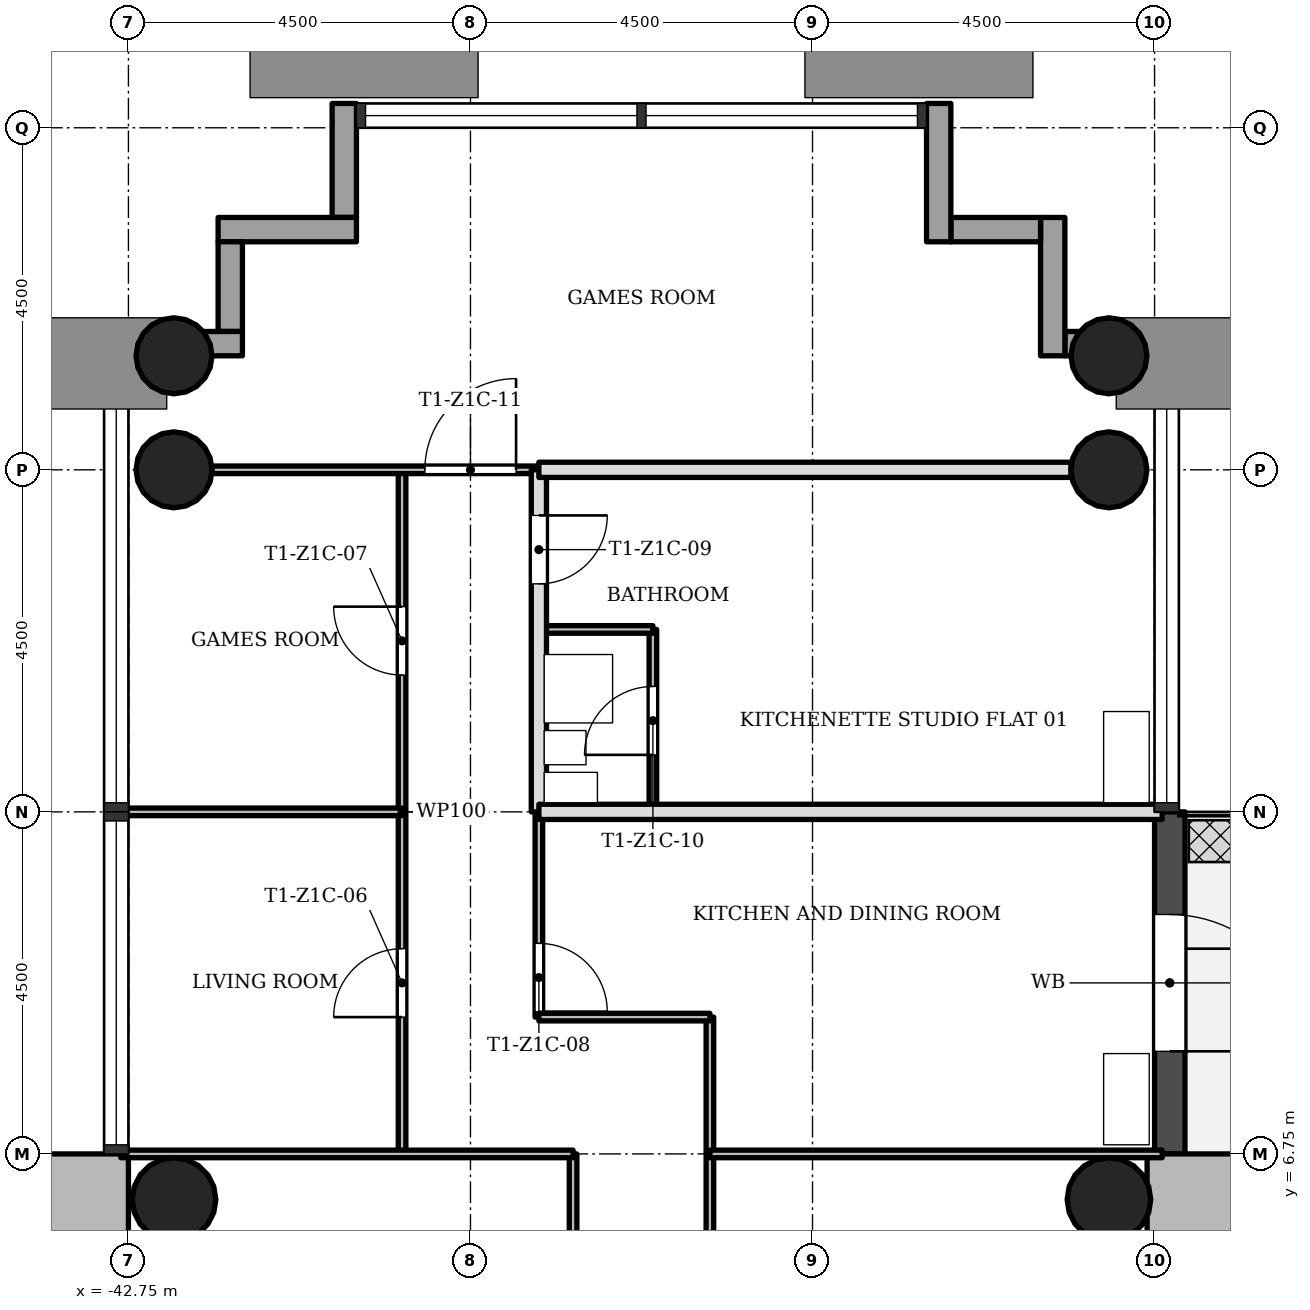
"""IFC4 building model, lengths in metres.
Left out: names, types, materials, properties, quantities, classifications, styles, units other than length and angle.
Written with IfcOpenShell. Run it as: python <this file> out.ifc"""

import sys

from ifc_helpers import new_model, si_unit, direction, frame, frame_2d, origin, origin_2d, place, context, subcontext, project, spatial, rectangle, hollow_circle, extrude, element, fill, save


model = new_model("IFC4")
c1 = context("Model", 3, precision=1e-05, world=origin(), true_north=direction((0.0, 1.0)))
c2 = subcontext(c1, "Body", "Model", "MODEL_VIEW")
j1 = project(units=[si_unit("LENGTHUNIT", "METRE"), si_unit("PLANEANGLEUNIT", "RADIAN")], contexts=[c1])
p1 = place(None, origin())
s1 = spatial("IfcSite", under=j1, at=p1, CompositionType="ELEMENT")
p2 = place(p1, origin())
s2 = spatial("IfcBuilding", under=s1, at=p2, CompositionType="ELEMENT")
p3 = place(p2, frame((0.0, 0.0, 51.7)))
s3 = spatial("IfcBuildingStorey", under=s2, at=p3, CompositionType="ELEMENT", Elevation=51.7)
p4 = place(p3, frame((-21.35, 6.2, 0.0), z_axis=(0.0, 0.0, 1.0), x_axis=(-1.0, 0.0, 0.0)))
e1 = element("IfcWall", 1, at=p4, inside=s3, PredefinedType="SHEAR", context=c2, shape_type="SweptSolid", body=[
    extrude(rectangle(XDim=7.998, YDim=1.1, at=frame_2d((3.999, 0.0))), origin(), (0.0, 0.0, 1.0), 3.4),
])
p5 = place(p3, frame((-43.3, -5.65, 0.0), z_axis=(0.0, 0.0, 1.0), x_axis=(0.0, 1.0, 0.0)))
e2 = element("IfcWall", 2, at=p5, inside=s3, PredefinedType="SHEAR", context=c2, shape_type="SweptSolid", body=[
    extrude(rectangle(XDim=12.4, YDim=1.1, at=frame_2d((6.2, 0.0))), origin(), (0.0, 0.0, 1.0), 3.4),
])
p6 = place(p5, frame((4.75, 0.0, 0.0)))
e3 = element("IfcOpeningElement", 3, at=p6, cuts=e2, PredefinedType="OPENING", context=c2, shape_type="SweptSolid", body=[
    extrude(rectangle(XDim=1.8, YDim=2.1, at=frame_2d((0.9, 1.05))), frame((0.0, 0.56, 0.0), z_axis=(0.0, -1.0, 0.0), x_axis=(1.0, 0.0, 0.0)), (0.0, 0.0, 1.0), 1.12),
])
for number, where, z_axis, x_axis in (
    (4, (-29.85, 15.75, 0.0), (0.0, 0.0, 1.0), (1.0, 0.0, 0.0)),
    (5, (-42.15, 15.75, 0.0), (0.0, 0.0, 1.0), (1.0, 0.0, 0.0)),
    (6, (-29.85, 17.25, 0.0), (0.0, 0.0, 1.0), (1.0, 0.0, 0.0)),
    (7, (-42.15, 17.25, 0.0), (0.0, 0.0, 1.0), (1.0, 0.0, 0.0)),
):
    element("IfcColumn", number, at=place(p3, frame(where, z_axis=z_axis, x_axis=x_axis)), inside=s3, PredefinedType="COLUMN", context=c2, shape_type="SweptSolid", body=[
        extrude(hollow_circle(Radius=0.5, WallThickness=0.036, at=origin_2d()), origin(), (0.0, 0.0, 1.0), 3.4),
    ])
for number, where, z_axis, x_axis in (
    (8, (-29.85, 6.15, 0.0), (0.0, 0.0, 1.0), (1.0, 0.0, 0.0)),
    (9, (-42.15, 6.15, 0.0), (0.0, 0.0, 1.0), (1.0, 0.0, 0.0)),
):
    element("IfcColumn", number, at=place(p3, frame(where, z_axis=z_axis, x_axis=x_axis)), inside=s3, PredefinedType="COLUMN", context=c2, shape_type="SweptSolid", body=[
        extrude(hollow_circle(Radius=0.55, WallThickness=0.04, at=origin_2d()), origin(), (0.0, 0.0, 1.0), 3.4),
    ])
p7 = place(p3, frame((-29.05, 6.75, -0.02), z_axis=(0.0, 0.0, 1.0), x_axis=(0.0, 1.0, 0.0)))
e10 = element("IfcWall", 10, at=p7, inside=s3, PredefinedType="STANDARD", context=c2, shape_type="SweptSolid", body=[
    extrude(rectangle(XDim=4.5, YDim=0.4, at=frame_2d((2.25, 0.0))), origin(), (0.0, 0.0, 1.0), 3.12),
])
p8 = place(p7, frame((1.35, 0.0, 0.02)))
e11 = element("IfcOpeningElement", 11, at=p8, cuts=e10, PredefinedType="OPENING", context=c2, shape_type="SweptSolid", body=[
    extrude(rectangle(XDim=1.8, YDim=2.1, at=frame_2d((0.9, 1.05))), frame((0.0, 0.21, 0.0), z_axis=(0.0, -1.0, 0.0), x_axis=(1.0, 0.0, 0.0)), (0.0, 0.0, 1.0), 0.42),
])
p9 = place(p3, frame((-28.93, 17.41, -0.3), z_axis=(0.0, 0.0, 1.0), x_axis=(-1.0, 0.0, 0.0)))
e12 = element("IfcWall", 12, at=p9, inside=s3, PredefinedType="STANDARD", context=c2, shape_type="SweptSolid", body=[
    extrude(rectangle(XDim=1.5, YDim=0.32, at=frame_2d((0.75, 0.0))), origin(), (0.0, 0.0, 1.0), 3.4),
])
p10 = place(p3, frame((-30.59, 17.25, -0.3), z_axis=(0.0, 0.0, 1.0), x_axis=(0.0, 1.0, 0.0)))
e13 = element("IfcWall", 13, at=p10, inside=s3, PredefinedType="STANDARD", context=c2, shape_type="SweptSolid", body=[
    extrude(rectangle(XDim=1.82, YDim=0.32, at=frame_2d((0.91, 0.0))), origin(), (0.0, 0.0, 1.0), 3.4),
])
p11 = place(p3, frame((-30.75, 18.91, -0.3), z_axis=(0.0, 0.0, 1.0), x_axis=(-1.0, 0.0, 0.0)))
e14 = element("IfcWall", 14, at=p11, inside=s3, PredefinedType="STANDARD", context=c2, shape_type="SweptSolid", body=[
    extrude(rectangle(XDim=1.18, YDim=0.32, at=frame_2d((0.59, 0.0))), origin(), (0.0, 0.0, 1.0), 3.4),
])
p12 = place(p3, frame((-32.09, 18.75, -0.3), z_axis=(0.0, 0.0, 1.0), x_axis=(0.0, 1.0, 0.0)))
e15 = element("IfcWall", 15, at=p12, inside=s3, PredefinedType="STANDARD", context=c2, shape_type="SweptSolid", body=[
    extrude(rectangle(XDim=1.82, YDim=0.32, at=frame_2d((0.91, 0.0))), origin(), (0.0, 0.0, 1.0), 3.4),
])
p13 = place(p3, frame((-39.91, 20.57, -0.3), z_axis=(0.0, 0.0, 1.0), x_axis=(0.0, -1.0, 0.0)))
e16 = element("IfcWall", 16, at=p13, inside=s3, PredefinedType="STANDARD", context=c2, shape_type="SweptSolid", body=[
    extrude(rectangle(XDim=1.5, YDim=0.32, at=frame_2d((0.75, 0.0))), origin(), (0.0, 0.0, 1.0), 3.4),
])
p14 = place(p3, frame((-39.75, 18.91, -0.3), z_axis=(0.0, 0.0, 1.0), x_axis=(-1.0, 0.0, 0.0)))
e17 = element("IfcWall", 17, at=p14, inside=s3, PredefinedType="STANDARD", context=c2, shape_type="SweptSolid", body=[
    extrude(rectangle(XDim=1.82, YDim=0.32, at=frame_2d((0.91, 0.0))), origin(), (0.0, 0.0, 1.0), 3.4),
])
p15 = place(p3, frame((-41.41, 18.75, -0.3), z_axis=(0.0, 0.0, 1.0), x_axis=(0.0, -1.0, 0.0)))
e18 = element("IfcWall", 18, at=p15, inside=s3, PredefinedType="STANDARD", context=c2, shape_type="SweptSolid", body=[
    extrude(rectangle(XDim=1.18, YDim=0.32, at=frame_2d((0.59, 0.0))), origin(), (0.0, 0.0, 1.0), 3.4),
])
p16 = place(p3, frame((-41.25, 17.41, -0.3), z_axis=(0.0, 0.0, 1.0), x_axis=(-1.0, 0.0, 0.0)))
e19 = element("IfcWall", 19, at=p16, inside=s3, PredefinedType="STANDARD", context=c2, shape_type="SweptSolid", body=[
    extrude(rectangle(XDim=1.82, YDim=0.32, at=frame_2d((0.91, 0.0))), origin(), (0.0, 0.0, 1.0), 3.4),
])
p17 = place(p3, frame((-39.15, 6.75, 0.0), z_axis=(0.0, 0.0, 1.0), x_axis=(0.0, 1.0, 0.0)))
e20 = element("IfcWall", 20, at=p17, inside=s3, PredefinedType="PARTITIONING", context=c2, shape_type="SweptSolid", body=[
    extrude(rectangle(XDim=9.0, YDim=0.1, at=frame_2d((4.5, 0.0))), origin(), (0.0, 0.0, 1.0), 3.0),
])
p18 = place(p17, frame((1.8, 0.0, 0.0)))
e21 = element("IfcOpeningElement", 21, at=p18, cuts=e20, PredefinedType="OPENING", context=c2, shape_type="SweptSolid", body=[
    extrude(rectangle(XDim=0.9, YDim=2.1, at=frame_2d((0.45, 1.05))), frame((0.0, 0.06, 0.0), z_axis=(0.0, -1.0, 0.0), x_axis=(1.0, 0.0, 0.0)), (0.0, 0.0, 1.0), 0.12),
])
p19 = place(p17, frame((6.3, 0.0, 0.0)))
e22 = element("IfcOpeningElement", 22, at=p19, cuts=e20, PredefinedType="OPENING", context=c2, shape_type="SweptSolid", body=[
    extrude(rectangle(XDim=0.9, YDim=2.1, at=frame_2d((0.45, 1.05))), frame((0.0, 0.06, 0.0), z_axis=(0.0, -1.0, 0.0), x_axis=(1.0, 0.0, 0.0)), (0.0, 0.0, 1.0), 0.12),
])
p20 = place(p3, frame((-37.35, 8.55, 0.0), z_axis=(0.0, 0.0, 1.0), x_axis=(0.0, 1.0, 0.0)))
e23 = element("IfcWall", 23, at=p20, inside=s3, PredefinedType="PARTITIONING", context=c2, shape_type="SweptSolid", body=[
    extrude(rectangle(XDim=2.7, YDim=0.1, at=frame_2d((1.35, 0.0))), origin(), (0.0, 0.0, 1.0), 3.0),
])
p21 = place(p20, frame((0.07, 0.0, 0.0)))
e24 = element("IfcOpeningElement", 24, at=p21, cuts=e23, PredefinedType="OPENING", context=c2, shape_type="SweptSolid", body=[
    extrude(rectangle(XDim=0.9, YDim=2.1, at=frame_2d((0.45, 1.05))), frame((0.0, 0.06, 0.0), z_axis=(0.0, -1.0, 0.0), x_axis=(1.0, 0.0, 0.0)), (0.0, 0.0, 1.0), 0.12),
])
p22 = place(p3, frame((-37.35, 11.25, 0.0), z_axis=(0.0, 0.0, 1.0), x_axis=(0.0, 1.0, 0.0)))
e25 = element("IfcWall", 25, at=p22, inside=s3, PredefinedType="SOLIDWALL", context=c2, shape_type="SweptSolid", body=[
    extrude(rectangle(XDim=4.5, YDim=0.2, at=frame_2d((2.25, 0.0))), origin(), (0.0, 0.0, 1.0), 3.0),
])
p23 = place(p22, frame((3.0, 0.0, 0.0)))
e26 = element("IfcOpeningElement", 26, at=p23, cuts=e25, PredefinedType="OPENING", context=c2, shape_type="SweptSolid", body=[
    extrude(rectangle(XDim=0.9, YDim=2.1, at=frame_2d((0.45, 1.05))), frame((0.0, 0.11, 0.0), z_axis=(0.0, -1.0, 0.0), x_axis=(1.0, 0.0, 0.0)), (0.0, 0.0, 1.0), 0.22),
])
p24 = place(p3, frame((-36.9, 1.5, 0.0), z_axis=(0.0, 0.0, 1.0), x_axis=(0.0, 1.0, 0.0)))
e27 = element("IfcWall", 27, at=p24, inside=s3, PredefinedType="PARTITIONING", context=c2, shape_type="SweptSolid", body=[
    extrude(rectangle(XDim=5.25, YDim=0.1, at=frame_2d((2.625, 0.0))), origin(), (0.0, 0.0, 1.0), 3.0),
])
p25 = place(p3, frame((-35.85, 11.25, 0.0), z_axis=(0.0, 0.0, 1.0), x_axis=(0.0, 1.0, 0.0)))
e28 = element("IfcWall", 28, at=p25, inside=s3, PredefinedType="PARTITIONING", context=c2, shape_type="SweptSolid", body=[
    extrude(rectangle(XDim=2.4, YDim=0.1, at=frame_2d((1.2, 0.0))), origin(), (0.0, 0.0, 1.0), 3.0),
])
p26 = place(p25, frame((0.75, 0.0, 0.0)))
e29 = element("IfcOpeningElement", 29, at=p26, cuts=e28, PredefinedType="OPENING", context=c2, shape_type="SweptSolid", body=[
    extrude(rectangle(XDim=0.9, YDim=2.1, at=frame_2d((0.45, 1.05))), frame((0.0, 0.06, 0.0), z_axis=(0.0, -1.0, 0.0), x_axis=(1.0, 0.0, 0.0)), (0.0, 0.0, 1.0), 0.12),
])
p27 = place(p3, frame((-35.1, 1.5, 0.0), z_axis=(0.0, 0.0, 1.0), x_axis=(0.0, 1.0, 0.0)))
e30 = element("IfcWall", 30, at=p27, inside=s3, PredefinedType="PARTITIONING", context=c2, shape_type="SweptSolid", body=[
    extrude(rectangle(XDim=7.05, YDim=0.1, at=frame_2d((3.525, 0.0))), origin(), (0.0, 0.0, 1.0), 3.0),
])
p28 = place(p27, frame((0.75, 0.0, 0.0)))
e31 = element("IfcOpeningElement", 31, at=p28, cuts=e30, PredefinedType="OPENING", context=c2, shape_type="SweptSolid", body=[
    extrude(rectangle(XDim=0.9, YDim=2.1, at=frame_2d((0.45, 1.05))), frame((0.0, 0.06, 0.0), z_axis=(0.0, -1.0, 0.0), x_axis=(1.0, 0.0, 0.0)), (0.0, 0.0, 1.0), 0.12),
])
for number, where, z_axis, x_axis in (
    (32, (-42.85, 6.75, 0.0), (0.0, 0.0, 1.0), (1.0, 0.0, 0.0)),
    (33, (-35.1, 6.75, 0.0), (0.0, 0.0, 1.0), (1.0, 0.0, 0.0)),
):
    element("IfcWall", number, at=place(p3, frame(where, z_axis=z_axis, x_axis=x_axis)), inside=s3, PredefinedType="PARTITIONING", context=c2, shape_type="SweptSolid", body=[
        extrude(rectangle(XDim=5.95, YDim=0.1, at=frame_2d((2.975, 0.0))), origin(), (0.0, 0.0, 1.0), 3.0),
    ])
p29 = place(p3, frame((-37.35, 8.55, 0.0), z_axis=(0.0, 0.0, 1.0), x_axis=(1.0, 0.0, 0.0)))
e34 = element("IfcWall", 34, at=p29, inside=s3, PredefinedType="PARTITIONING", context=c2, shape_type="SweptSolid", body=[
    extrude(rectangle(XDim=2.25, YDim=0.1, at=frame_2d((1.125, 0.0))), origin(), (0.0, 0.0, 1.0), 3.0),
])
p30 = place(p3, frame((-42.85, 11.25, 0.0), z_axis=(0.0, 0.0, 1.0), x_axis=(1.0, 0.0, 0.0)))
e35 = element("IfcWall", 35, at=p30, inside=s3, PredefinedType="PARTITIONING", context=c2, shape_type="SweptSolid", body=[
    extrude(rectangle(XDim=3.7, YDim=0.1, at=frame_2d((1.85, 0.0))), origin(), (0.0, 0.0, 1.0), 3.0),
])
p31 = place(p3, frame((-37.35, 11.25, 0.0), z_axis=(0.0, 0.0, 1.0), x_axis=(1.0, 0.0, 0.0)))
e36 = element("IfcWall", 36, at=p31, inside=s3, PredefinedType="SOLIDWALL", context=c2, shape_type="SweptSolid", body=[
    extrude(rectangle(XDim=8.2, YDim=0.2, at=frame_2d((4.1, 0.0))), origin(), (0.0, 0.0, 1.0), 3.0),
])
p32 = place(p3, frame((-37.35, 13.65, 0.0), z_axis=(0.0, 0.0, 1.0), x_axis=(1.0, 0.0, 0.0)))
e37 = element("IfcWall", 37, at=p32, inside=s3, PredefinedType="PARTITIONING", context=c2, shape_type="SweptSolid", body=[
    extrude(rectangle(XDim=1.5, YDim=0.1, at=frame_2d((0.75, 0.0))), origin(), (0.0, 0.0, 1.0), 3.0),
])
p33 = place(p3, frame((-41.65, 15.75, 0.0), z_axis=(0.0, 0.0, 1.0), x_axis=(1.0, 0.0, 0.0)))
e38 = element("IfcWall", 38, at=p33, inside=s3, PredefinedType="PARTITIONING", context=c2, shape_type="SweptSolid", body=[
    extrude(rectangle(XDim=4.3, YDim=0.1, at=frame_2d((2.15, 0.0))), origin(), (0.0, 0.0, 1.0), 3.0),
])
p34 = place(p33, frame((2.8, 0.0, 0.0)))
e39 = element("IfcOpeningElement", 39, at=p34, cuts=e38, PredefinedType="OPENING", context=c2, shape_type="SweptSolid", body=[
    extrude(rectangle(XDim=1.2, YDim=2.1, at=frame_2d((0.6, 1.05))), frame((0.0, 0.06, 0.0), z_axis=(0.0, -1.0, 0.0), x_axis=(1.0, 0.0, 0.0)), (0.0, 0.0, 1.0), 0.12),
])
p35 = place(p3, frame((-37.35, 15.75, 0.0), z_axis=(0.0, 0.0, 1.0), x_axis=(1.0, 0.0, 0.0)))
e40 = element("IfcWall", 40, at=p35, inside=s3, PredefinedType="SOLIDWALL", context=c2, shape_type="SweptSolid", body=[
    extrude(rectangle(XDim=7.0, YDim=0.2, at=frame_2d((3.5, 0.0))), origin(), (0.0, 0.0, 1.0), 3.0),
])
p36 = place(p8, origin())
e41 = element("IfcDoor", 41, at=p36, inside=s3, OperationType="SINGLE_SWING_LEFT", PredefinedType="DOOR", context=c2, shape_type="SweptSolid", body=[
    extrude(rectangle(XDim=1.8, YDim=2.1, at=frame_2d((0.9, 1.05))), frame((0.0, 0.025, 0.0), z_axis=(0.0, -1.0, 0.0), x_axis=(1.0, 0.0, 0.0)), (0.0, 0.0, 1.0), 0.05),
])
fill(e11, e41)
p37 = place(p18, origin())
e42 = element("IfcDoor", 42, at=p37, inside=s3, OperationType="SINGLE_SWING_RIGHT", PredefinedType="DOOR", context=c2, shape_type="SweptSolid", body=[
    extrude(rectangle(XDim=0.9, YDim=2.1, at=frame_2d((0.45, 1.05))), frame((0.0, 0.025, 0.0), z_axis=(0.0, -1.0, 0.0), x_axis=(1.0, 0.0, 0.0)), (0.0, 0.0, 1.0), 0.05),
])
fill(e21, e42)
p38 = place(p19, origin())
e43 = element("IfcDoor", 43, at=p38, inside=s3, OperationType="SINGLE_SWING_LEFT", PredefinedType="DOOR", context=c2, shape_type="SweptSolid", body=[
    extrude(rectangle(XDim=0.9, YDim=2.1, at=frame_2d((0.45, 1.05))), frame((0.0, 0.025, 0.0), z_axis=(0.0, -1.0, 0.0), x_axis=(1.0, 0.0, 0.0)), (0.0, 0.0, 1.0), 0.05),
])
fill(e22, e43)
p39 = place(p21, origin())
e44 = element("IfcDoor", 44, at=p39, inside=s3, OperationType="SINGLE_SWING_LEFT", PredefinedType="DOOR", context=c2, shape_type="SweptSolid", body=[
    extrude(rectangle(XDim=0.9, YDim=2.1, at=frame_2d((0.45, 1.05))), frame((0.0, 0.025, 0.0), z_axis=(0.0, -1.0, 0.0), x_axis=(1.0, 0.0, 0.0)), (0.0, 0.0, 1.0), 0.05),
])
fill(e24, e44)
p40 = place(p23, origin())
e45 = element("IfcDoor", 45, at=p40, inside=s3, OperationType="SINGLE_SWING_RIGHT", PredefinedType="DOOR", context=c2, shape_type="SweptSolid", body=[
    extrude(rectangle(XDim=0.9, YDim=2.1, at=frame_2d((0.45, 1.05))), frame((0.0, 0.025, 0.0), z_axis=(0.0, -1.0, 0.0), x_axis=(1.0, 0.0, 0.0)), (0.0, 0.0, 1.0), 0.05),
])
fill(e26, e45)
p41 = place(p26, origin())
e46 = element("IfcDoor", 46, at=p41, inside=s3, OperationType="SINGLE_SWING_RIGHT", PredefinedType="DOOR", context=c2, shape_type="SweptSolid", body=[
    extrude(rectangle(XDim=0.9, YDim=2.1, at=frame_2d((0.45, 1.05))), frame((0.0, 0.025, 0.0), z_axis=(0.0, -1.0, 0.0), x_axis=(1.0, 0.0, 0.0)), (0.0, 0.0, 1.0), 0.05),
])
fill(e29, e46)
p42 = place(p34, origin())
e47 = element("IfcDoor", 47, at=p42, inside=s3, OperationType="SINGLE_SWING_LEFT", PredefinedType="DOOR", context=c2, shape_type="SweptSolid", body=[
    extrude(rectangle(XDim=1.2, YDim=2.1, at=frame_2d((0.6, 1.05))), frame((0.0, 0.025, 0.0), z_axis=(0.0, -1.0, 0.0), x_axis=(1.0, 0.0, 0.0)), (0.0, 0.0, 1.0), 0.05),
])
fill(e39, e47)
save(model, sys.argv[1])
